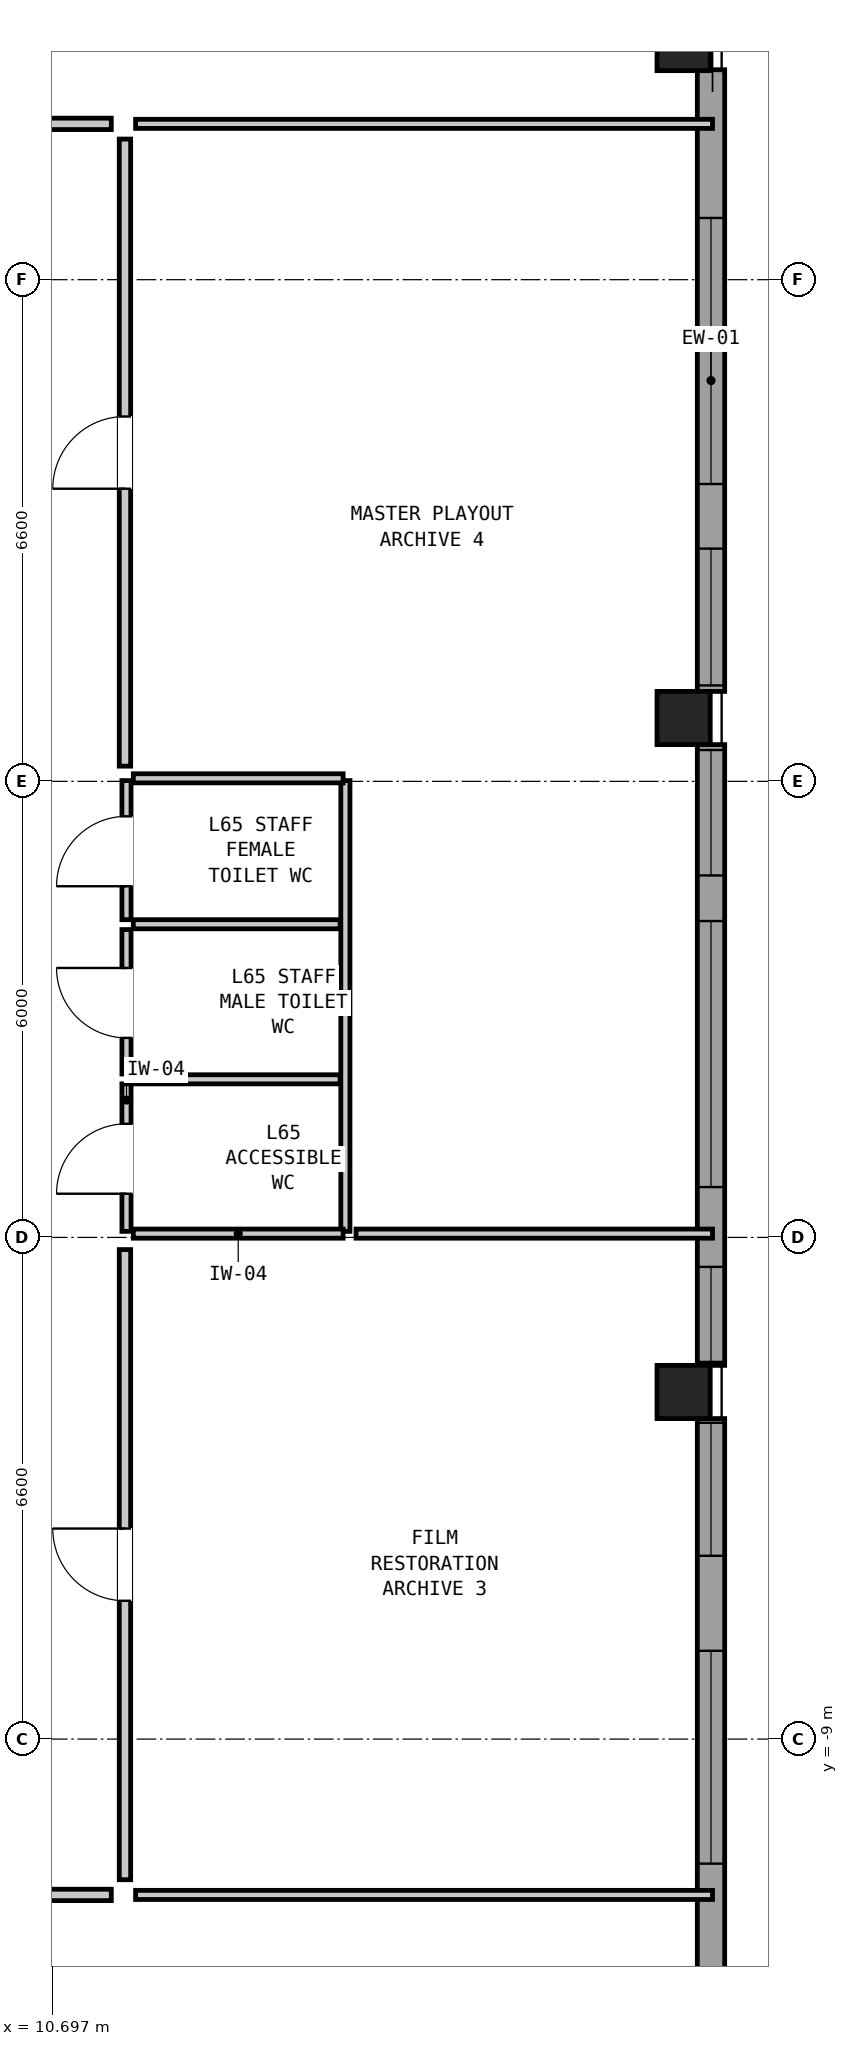
"""IFC4 building model, lengths in metres.
Left out: names, types, materials, properties, quantities, classifications, styles, units other than length and angle.
Written with IfcOpenShell. Run it as: python <this file> out.ifc"""

import sys

from ifc_helpers import new_model, si_unit, direction, frame, frame_2d, origin, origin_2d, place, context, subcontext, project, spatial, rectangle, hollow_rectangle, extrude, element, fill, save


model = new_model("IFC4")
c1 = context("Model", 3, precision=1e-05, world=origin(), true_north=direction((0.0, 1.0)))
c2 = subcontext(c1, "Body", "Model", "MODEL_VIEW")
j1 = project(units=[si_unit("LENGTHUNIT", "METRE"), si_unit("PLANEANGLEUNIT", "RADIAN")], contexts=[c1])
p1 = place(None, origin())
s1 = spatial("IfcSite", under=j1, at=p1, CompositionType="ELEMENT")
p2 = place(p1, origin())
s2 = spatial("IfcBuilding", under=s1, at=p2, CompositionType="ELEMENT")
p3 = place(p2, frame((0.0, 0.0, 220.85)))
s3 = spatial("IfcBuildingStorey", under=s2, at=p3, CompositionType="ELEMENT", Elevation=220.85)
for number, where, z_axis, x_axis in (
    (1, (19.0, -4.433, 0.0), (0.0, 0.0, 1.0), (0.0, 1.0, 0.0)),
    (2, (19.0, 4.433, 0.0), (0.0, 0.0, 1.0), (0.0, 1.0, 0.0)),
    (3, (19.0, 13.3, 0.0), (0.0, 0.0, 1.0), (0.0, 1.0, 0.0)),
):
    element("IfcColumn", number, at=place(p3, frame(where, z_axis=z_axis, x_axis=x_axis)), inside=s3, PredefinedType="COLUMN", context=c2, shape_type="SweptSolid", body=[
        extrude(hollow_rectangle(XDim=0.7, YDim=0.7, WallThickness=0.045, at=origin_2d()), origin(), (0.0, 0.0, 1.0), 3.05),
    ])
p4 = place(p3, frame((19.36, 12.962, 0.0), z_axis=(0.0, 0.0, 1.0), x_axis=(0.0, -1.0, 0.0)))
e4 = element("IfcWall", 4, at=p4, inside=s3, PredefinedType="SOLIDWALL", context=c2, shape_type="SweptSolid", body=[
    extrude(rectangle(XDim=8.179, YDim=0.36, at=frame_2d((4.089, 0.0))), origin(), (0.0, 0.0, 1.0), 2.374),
])
p5 = place(p4, frame((1.95, 0.0, 0.2)))
e5 = element("IfcOpeningElement", 5, at=p5, cuts=e4, PredefinedType="OPENING", context=c2, shape_type="SweptSolid", body=[
    extrude(rectangle(XDim=3.5, YDim=0.95, at=frame_2d((1.75, 0.475))), frame((0.0, 0.192, 0.0), z_axis=(0.0, -1.0, 0.0), x_axis=(1.0, 0.0, 0.0)), (0.0, 0.0, 1.0), 0.384),
])
p6 = place(p4, frame((6.3, 0.0, 1.15)))
e6 = element("IfcOpeningElement", 6, at=p6, cuts=e4, PredefinedType="OPENING", context=c2, shape_type="SweptSolid", body=[
    extrude(rectangle(XDim=1.8, YDim=1.05, at=frame_2d((0.9, 0.525))), frame((0.0, 0.192, 0.0), z_axis=(0.0, -1.0, 0.0), x_axis=(1.0, 0.0, 0.0)), (0.0, 0.0, 1.0), 0.384),
])
p7 = place(p3, frame((19.36, 4.083, 0.0), z_axis=(0.0, 0.0, 1.0), x_axis=(0.0, -1.0, 0.0)))
e7 = element("IfcWall", 7, at=p7, inside=s3, PredefinedType="SOLIDWALL", context=c2, shape_type="SweptSolid", body=[
    extrude(rectangle(XDim=8.167, YDim=0.36, at=frame_2d((4.083, 0.0))), origin(), (0.0, 0.0, 1.0), 2.374),
])
p8 = place(p7, frame((0.071, 0.0, 1.3)))
e8 = element("IfcOpeningElement", 8, at=p8, cuts=e7, PredefinedType="OPENING", context=c2, shape_type="SweptSolid", body=[
    extrude(rectangle(XDim=1.65, YDim=0.9, at=frame_2d((0.825, 0.45))), frame((0.0, 0.192, 0.0), z_axis=(0.0, -1.0, 0.0), x_axis=(1.0, 0.0, 0.0)), (0.0, 0.0, 1.0), 0.384),
])
p9 = place(p7, frame((2.321, 0.0, 0.2)))
e9 = element("IfcOpeningElement", 9, at=p9, cuts=e7, PredefinedType="OPENING", context=c2, shape_type="SweptSolid", body=[
    extrude(rectangle(XDim=3.5, YDim=0.95, at=frame_2d((1.75, 0.475))), frame((0.0, 0.192, 0.0), z_axis=(0.0, -1.0, 0.0), x_axis=(1.0, 0.0, 0.0)), (0.0, 0.0, 1.0), 0.384),
])
p10 = place(p7, frame((6.871, 0.0, 1.05)))
e10 = element("IfcOpeningElement", 10, at=p10, cuts=e7, PredefinedType="OPENING", context=c2, shape_type="SweptSolid", body=[
    extrude(rectangle(XDim=1.25, YDim=1.15, at=frame_2d((0.625, 0.575))), frame((0.0, 0.192, 0.0), z_axis=(0.0, -1.0, 0.0), x_axis=(1.0, 0.0, 0.0)), (0.0, 0.0, 1.0), 0.384),
])
p11 = place(p3, frame((19.36, -4.783, 0.0), z_axis=(0.0, 0.0, 1.0), x_axis=(0.0, -1.0, 0.0)))
e11 = element("IfcWall", 11, at=p11, inside=s3, PredefinedType="SOLIDWALL", context=c2, shape_type="SweptSolid", body=[
    extrude(rectangle(XDim=8.179, YDim=0.36, at=frame_2d((4.089, 0.0))), origin(), (0.0, 0.0, 1.0), 2.374),
])
p12 = place(p11, frame((0.055, 0.0, 1.1)))
e12 = element("IfcOpeningElement", 12, at=p12, cuts=e11, PredefinedType="OPENING", context=c2, shape_type="SweptSolid", body=[
    extrude(rectangle(XDim=1.75, YDim=1.1, at=frame_2d((0.875, 0.55))), frame((0.0, 0.192, 0.0), z_axis=(0.0, -1.0, 0.0), x_axis=(1.0, 0.0, 0.0)), (0.0, 0.0, 1.0), 0.384),
])
p13 = place(p11, frame((3.055, 0.0, 0.2)))
e13 = element("IfcOpeningElement", 13, at=p13, cuts=e11, PredefinedType="OPENING", context=c2, shape_type="SweptSolid", body=[
    extrude(rectangle(XDim=2.8, YDim=1.15, at=frame_2d((1.4, 0.575))), frame((0.0, 0.192, 0.0), z_axis=(0.0, -1.0, 0.0), x_axis=(1.0, 0.0, 0.0)), (0.0, 0.0, 1.0), 0.384),
])
p14 = place(p3, frame((11.67, -2.32, 0.0), z_axis=(0.0, 0.0, 1.0), x_axis=(0.0, 1.0, 0.0)))
e14 = element("IfcWall", 14, at=p14, inside=s3, PredefinedType="PARTITIONING", context=c2, shape_type="SweptSolid", body=[
    extrude(rectangle(XDim=1.94, YDim=0.12, at=frame_2d((0.97, 0.0))), origin(), (0.0, 0.0, 1.0), 2.86),
])
p15 = place(p14, frame((0.495, 0.0, 0.0)))
e15 = element("IfcOpeningElement", 15, at=p15, cuts=e14, PredefinedType="OPENING", context=c2, shape_type="SweptSolid", body=[
    extrude(rectangle(XDim=0.92, YDim=2.1, at=frame_2d((0.46, 1.05))), frame((0.0, 0.072, 0.0), z_axis=(0.0, -1.0, 0.0), x_axis=(1.0, 0.0, 0.0)), (0.0, 0.0, 1.0), 0.144),
])
p16 = place(p3, frame((11.67, -0.25, 0.0), z_axis=(0.0, 0.0, 1.0), x_axis=(0.0, 1.0, 0.0)))
e16 = element("IfcWall", 16, at=p16, inside=s3, PredefinedType="PARTITIONING", context=c2, shape_type="SweptSolid", body=[
    extrude(rectangle(XDim=1.9, YDim=0.12, at=frame_2d((0.95, 0.0))), origin(), (0.0, 0.0, 1.0), 2.86),
])
p17 = place(p16, frame((0.475, 0.0, 0.0)))
e17 = element("IfcOpeningElement", 17, at=p17, cuts=e16, PredefinedType="OPENING", context=c2, shape_type="SweptSolid", body=[
    extrude(rectangle(XDim=0.92, YDim=2.1, at=frame_2d((0.46, 1.05))), frame((0.0, 0.072, 0.0), z_axis=(0.0, -1.0, 0.0), x_axis=(1.0, 0.0, 0.0)), (0.0, 0.0, 1.0), 0.144),
])
p18 = place(p3, frame((11.67, 1.78, 0.0), z_axis=(0.0, 0.0, 1.0), x_axis=(0.0, 1.0, 0.0)))
e18 = element("IfcWall", 18, at=p18, inside=s3, PredefinedType="PARTITIONING", context=c2, shape_type="SweptSolid", body=[
    extrude(rectangle(XDim=1.83, YDim=0.12, at=frame_2d((0.915, 0.0))), origin(), (0.0, 0.0, 1.0), 2.86),
])
p19 = place(p18, frame((0.44, 0.0, 0.0)))
e19 = element("IfcOpeningElement", 19, at=p19, cuts=e18, PredefinedType="OPENING", context=c2, shape_type="SweptSolid", body=[
    extrude(rectangle(XDim=0.92, YDim=2.1, at=frame_2d((0.46, 1.05))), frame((0.0, 0.072, 0.0), z_axis=(0.0, -1.0, 0.0), x_axis=(1.0, 0.0, 0.0)), (0.0, 0.0, 1.0), 0.144),
])
p20 = place(p3, frame((14.55, -2.32, 0.0), z_axis=(0.0, 0.0, 1.0), x_axis=(0.0, 1.0, 0.0)))
e20 = element("IfcWall", 20, at=p20, inside=s3, PredefinedType="PARTITIONING", context=c2, shape_type="SweptSolid", body=[
    extrude(rectangle(XDim=5.93, YDim=0.12, at=frame_2d((2.965, 0.0))), origin(), (0.0, 0.0, 1.0), 2.86),
])
for number, where, z_axis, x_axis in (
    (21, (11.76, -2.35, 0.0), (0.0, 0.0, 1.0), (1.0, 0.0, 0.0)),
    (22, (11.76, 3.64, 0.0), (0.0, 0.0, 1.0), (1.0, 0.0, 0.0)),
):
    element("IfcWall", number, at=place(p3, frame(where, z_axis=z_axis, x_axis=x_axis)), inside=s3, PredefinedType="PARTITIONING", context=c2, shape_type="SweptSolid", body=[
        extrude(rectangle(XDim=2.76, YDim=0.12, at=frame_2d((1.38, 0.0))), origin(), (0.0, 0.0, 1.0), 1.981),
    ])
for number, where, z_axis, x_axis in (
    (23, (11.76, -0.32, 0.0), (0.0, 0.0, 1.0), (1.0, 0.0, 0.0)),
    (24, (11.76, 1.72, 0.0), (0.0, 0.0, 1.0), (1.0, 0.0, 0.0)),
):
    element("IfcWall", number, at=place(p3, frame(where, z_axis=z_axis, x_axis=x_axis)), inside=s3, PredefinedType="PARTITIONING", context=c2, shape_type="SweptSolid", body=[
        extrude(rectangle(XDim=2.72, YDim=0.12, at=frame_2d((1.36, 0.0))), origin(), (0.0, 0.0, 1.0), 2.86),
    ])
for number, where, z_axis, x_axis in (
    (25, (11.79, 12.25, 0.0), (0.0, 0.0, 1.0), (1.0, 0.0, 0.0)),
    (26, (11.79, -11.05, 0.0), (0.0, 0.0, 1.0), (1.0, 0.0, 0.0)),
):
    element("IfcWall", number, at=place(p3, frame(where, z_axis=z_axis, x_axis=x_axis)), inside=s3, PredefinedType="PARTITIONING", context=c2, shape_type="SweptSolid", body=[
        extrude(rectangle(XDim=7.59, YDim=0.12, at=frame_2d((3.795, 0.0))), origin(), (0.0, 0.0, 1.0), 2.86),
    ])
p21 = place(p3, frame((14.69, -2.35, 0.0), z_axis=(0.0, 0.0, 1.0), x_axis=(1.0, 0.0, 0.0)))
e27 = element("IfcWall", 27, at=p21, inside=s3, PredefinedType="PARTITIONING", context=c2, shape_type="SweptSolid", body=[
    extrude(rectangle(XDim=4.69, YDim=0.12, at=frame_2d((2.345, 0.0))), origin(), (0.0, 0.0, 1.0), 1.981),
])
p22 = place(p3, frame((6.68, 12.25, 0.0), z_axis=(0.0, 0.0, 1.0), x_axis=(1.0, 0.0, 0.0)))
e28 = element("IfcWall", 28, at=p22, inside=s3, PredefinedType="PARTITIONING", context=c2, shape_type="SweptSolid", body=[
    extrude(rectangle(XDim=4.79, YDim=0.15, at=frame_2d((2.395, 0.0))), origin(), (0.0, 0.0, 1.0), 2.86),
])
p23 = place(p22, frame((1.32, 0.0, 0.0)))
e29 = element("IfcOpeningElement", 29, at=p23, cuts=e28, PredefinedType="OPENING", context=c2, shape_type="SweptSolid", body=[
    extrude(rectangle(XDim=0.95, YDim=2.1, at=frame_2d((0.475, 1.05))), frame((0.0, 0.087, 0.0), z_axis=(0.0, -1.0, 0.0), x_axis=(1.0, 0.0, 0.0)), (0.0, 0.0, 1.0), 0.174),
])
p24 = place(p3, frame((7.68, -11.05, 0.0), z_axis=(0.0, 0.0, 1.0), x_axis=(1.0, 0.0, 0.0)))
e30 = element("IfcWall", 30, at=p24, inside=s3, PredefinedType="PARTITIONING", context=c2, shape_type="SweptSolid", body=[
    extrude(rectangle(XDim=3.79, YDim=0.15, at=frame_2d((1.895, 0.0))), origin(), (0.0, 0.0, 1.0), 2.86),
])
p25 = place(p24, frame((2.02, 0.0, 0.0)))
e31 = element("IfcOpeningElement", 31, at=p25, cuts=e30, PredefinedType="OPENING", context=c2, shape_type="SweptSolid", body=[
    extrude(rectangle(XDim=0.95, YDim=2.1, at=frame_2d((0.475, 1.05))), frame((0.0, 0.087, 0.0), z_axis=(0.0, -1.0, 0.0), x_axis=(1.0, 0.0, 0.0)), (0.0, 0.0, 1.0), 0.174),
])
p26 = place(p3, frame((11.65, -10.85, 0.0), z_axis=(0.0, 0.0, 1.0), x_axis=(0.0, 1.0, 0.0)))
e32 = element("IfcWall", 32, at=p26, inside=s3, PredefinedType="PARTITIONING", context=c2, shape_type="SweptSolid", body=[
    extrude(rectangle(XDim=8.29, YDim=0.15, at=frame_2d((4.145, 0.0))), origin(), (0.0, 0.0, 1.0), 2.86),
])
p27 = place(p26, frame((3.67, 0.0, 0.0)))
e33 = element("IfcOpeningElement", 33, at=p27, cuts=e32, PredefinedType="OPENING", context=c2, shape_type="SweptSolid", body=[
    extrude(rectangle(XDim=0.95, YDim=2.1, at=frame_2d((0.475, 1.05))), frame((0.0, 0.087, 0.0), z_axis=(0.0, -1.0, 0.0), x_axis=(1.0, 0.0, 0.0)), (0.0, 0.0, 1.0), 0.174),
])
p28 = place(p3, frame((11.65, 3.8, 0.0), z_axis=(0.0, 0.0, 1.0), x_axis=(0.0, 1.0, 0.0)))
e34 = element("IfcWall", 34, at=p28, inside=s3, PredefinedType="PARTITIONING", context=c2, shape_type="SweptSolid", body=[
    extrude(rectangle(XDim=8.25, YDim=0.15, at=frame_2d((4.125, 0.0))), origin(), (0.0, 0.0, 1.0), 2.86),
])
p29 = place(p28, frame((3.65, 0.0, 0.0)))
e35 = element("IfcOpeningElement", 35, at=p29, cuts=e34, PredefinedType="OPENING", context=c2, shape_type="SweptSolid", body=[
    extrude(rectangle(XDim=0.95, YDim=2.1, at=frame_2d((0.475, 1.05))), frame((0.0, 0.087, 0.0), z_axis=(0.0, -1.0, 0.0), x_axis=(1.0, 0.0, 0.0)), (0.0, 0.0, 1.0), 0.174),
])
p30 = place(p5, origin())
e36 = element("IfcWindow", 36, at=p30, inside=s3, PartitioningType="SINGLE_PANEL", PredefinedType="WINDOW", context=c2, shape_type="SweptSolid", body=[
    extrude(rectangle(XDim=3.5, YDim=0.95, at=frame_2d((1.75, 0.475))), frame((0.0, 0.03, 0.0), z_axis=(0.0, -1.0, 0.0), x_axis=(1.0, 0.0, 0.0)), (0.0, 0.0, 1.0), 0.06),
])
fill(e5, e36)
p31 = place(p6, origin())
e37 = element("IfcWindow", 37, at=p31, inside=s3, PartitioningType="SINGLE_PANEL", PredefinedType="WINDOW", context=c2, shape_type="SweptSolid", body=[
    extrude(rectangle(XDim=1.8, YDim=1.05, at=frame_2d((0.9, 0.525))), frame((0.0, 0.03, 0.0), z_axis=(0.0, -1.0, 0.0), x_axis=(1.0, 0.0, 0.0)), (0.0, 0.0, 1.0), 0.06),
])
fill(e6, e37)
p32 = place(p8, origin())
e38 = element("IfcWindow", 38, at=p32, inside=s3, PartitioningType="SINGLE_PANEL", PredefinedType="WINDOW", context=c2, shape_type="SweptSolid", body=[
    extrude(rectangle(XDim=1.65, YDim=0.9, at=frame_2d((0.825, 0.45))), frame((0.0, 0.03, 0.0), z_axis=(0.0, -1.0, 0.0), x_axis=(1.0, 0.0, 0.0)), (0.0, 0.0, 1.0), 0.06),
])
fill(e8, e38)
p33 = place(p9, origin())
e39 = element("IfcWindow", 39, at=p33, inside=s3, PartitioningType="SINGLE_PANEL", PredefinedType="WINDOW", context=c2, shape_type="SweptSolid", body=[
    extrude(rectangle(XDim=3.5, YDim=0.95, at=frame_2d((1.75, 0.475))), frame((0.0, 0.03, 0.0), z_axis=(0.0, -1.0, 0.0), x_axis=(1.0, 0.0, 0.0)), (0.0, 0.0, 1.0), 0.06),
])
fill(e9, e39)
p34 = place(p10, origin())
e40 = element("IfcWindow", 40, at=p34, inside=s3, PartitioningType="SINGLE_PANEL", PredefinedType="WINDOW", context=c2, shape_type="SweptSolid", body=[
    extrude(rectangle(XDim=1.25, YDim=1.15, at=frame_2d((0.625, 0.575))), frame((0.0, 0.03, 0.0), z_axis=(0.0, -1.0, 0.0), x_axis=(1.0, 0.0, 0.0)), (0.0, 0.0, 1.0), 0.06),
])
fill(e10, e40)
p35 = place(p12, origin())
e41 = element("IfcWindow", 41, at=p35, inside=s3, PartitioningType="SINGLE_PANEL", PredefinedType="WINDOW", context=c2, shape_type="SweptSolid", body=[
    extrude(rectangle(XDim=1.75, YDim=1.1, at=frame_2d((0.875, 0.55))), frame((0.0, 0.03, 0.0), z_axis=(0.0, -1.0, 0.0), x_axis=(1.0, 0.0, 0.0)), (0.0, 0.0, 1.0), 0.06),
])
fill(e12, e41)
p36 = place(p13, origin())
e42 = element("IfcWindow", 42, at=p36, inside=s3, PartitioningType="SINGLE_PANEL", PredefinedType="WINDOW", context=c2, shape_type="SweptSolid", body=[
    extrude(rectangle(XDim=2.8, YDim=1.15, at=frame_2d((1.4, 0.575))), frame((0.0, 0.03, 0.0), z_axis=(0.0, -1.0, 0.0), x_axis=(1.0, 0.0, 0.0)), (0.0, 0.0, 1.0), 0.06),
])
fill(e13, e42)
p37 = place(p15, origin())
e43 = element("IfcDoor", 43, at=p37, inside=s3, OperationType="SINGLE_SWING_LEFT", PredefinedType="DOOR", context=c2, shape_type="SweptSolid", body=[
    extrude(rectangle(XDim=0.92, YDim=2.1, at=frame_2d((0.46, 1.05))), frame((0.0, 0.025, 0.0), z_axis=(0.0, -1.0, 0.0), x_axis=(1.0, 0.0, 0.0)), (0.0, 0.0, 1.0), 0.05),
])
fill(e15, e43)
p38 = place(p17, origin())
e44 = element("IfcDoor", 44, at=p38, inside=s3, OperationType="SINGLE_SWING_RIGHT", PredefinedType="DOOR", context=c2, shape_type="SweptSolid", body=[
    extrude(rectangle(XDim=0.92, YDim=2.1, at=frame_2d((0.46, 1.05))), frame((0.0, 0.025, 0.0), z_axis=(0.0, -1.0, 0.0), x_axis=(1.0, 0.0, 0.0)), (0.0, 0.0, 1.0), 0.05),
])
fill(e17, e44)
p39 = place(p19, origin())
e45 = element("IfcDoor", 45, at=p39, inside=s3, OperationType="SINGLE_SWING_LEFT", PredefinedType="DOOR", context=c2, shape_type="SweptSolid", body=[
    extrude(rectangle(XDim=0.92, YDim=2.1, at=frame_2d((0.46, 1.05))), frame((0.0, 0.025, 0.0), z_axis=(0.0, -1.0, 0.0), x_axis=(1.0, 0.0, 0.0)), (0.0, 0.0, 1.0), 0.05),
])
fill(e19, e45)
p40 = place(p27, origin())
e46 = element("IfcDoor", 46, at=p40, inside=s3, OperationType="SINGLE_SWING_RIGHT", PredefinedType="DOOR", context=c2, shape_type="SweptSolid", body=[
    extrude(rectangle(XDim=0.95, YDim=2.1, at=frame_2d((0.475, 1.05))), frame((0.0, 0.025, 0.0), z_axis=(0.0, -1.0, 0.0), x_axis=(1.0, 0.0, 0.0)), (0.0, 0.0, 1.0), 0.05),
])
fill(e33, e46)
p41 = place(p29, origin())
e47 = element("IfcDoor", 47, at=p41, inside=s3, OperationType="SINGLE_SWING_LEFT", PredefinedType="DOOR", context=c2, shape_type="SweptSolid", body=[
    extrude(rectangle(XDim=0.95, YDim=2.1, at=frame_2d((0.475, 1.05))), frame((0.0, 0.025, 0.0), z_axis=(0.0, -1.0, 0.0), x_axis=(1.0, 0.0, 0.0)), (0.0, 0.0, 1.0), 0.05),
])
fill(e35, e47)
save(model, sys.argv[1])
